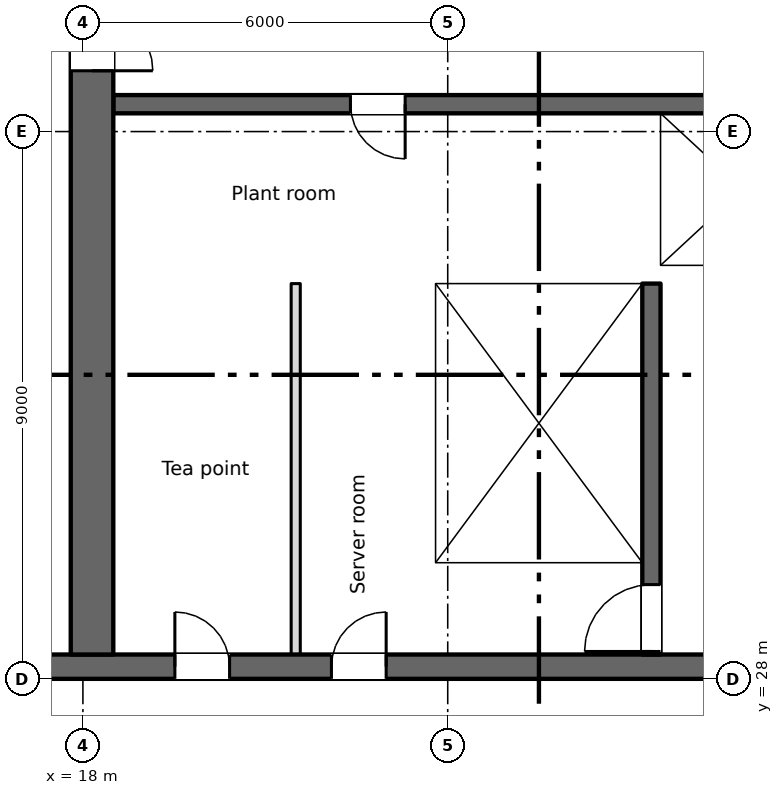
"""IFC4 building model, lengths in metres.
Left out: names, types, materials, properties, quantities, classifications, styles, units other than length and angle.
Written with IfcOpenShell. Run it as: python <this file> out.ifc"""

import sys

from ifc_helpers import new_model, si_unit, direction, frame, frame_2d, origin, place, context, subcontext, project, spatial, rectangle, extrude, element, fill, save


model = new_model("IFC4")
c1 = context("Model", 3, precision=1e-05, world=origin(), true_north=direction((0.0, 1.0)))
c2 = subcontext(c1, "Body", "Model", "MODEL_VIEW")
j1 = project(units=[si_unit("LENGTHUNIT", "METRE"), si_unit("PLANEANGLEUNIT", "RADIAN")], contexts=[c1])
p1 = place(None, origin())
s1 = spatial("IfcSite", under=j1, at=p1, CompositionType="ELEMENT")
p2 = place(p1, origin())
s2 = spatial("IfcBuilding", under=s1, at=p2, CompositionType="ELEMENT")
p3 = place(p2, frame((0.0, 0.0, 185.5)))
s3 = spatial("IfcBuildingStorey", under=s2, at=p3, CompositionType="ELEMENT", Elevation=185.5)
p4 = place(p3, frame((6.6, 28.2, 0.0), z_axis=(0.0, 0.0, 1.0), x_axis=(1.0, 0.0, 0.0)))
e1 = element("IfcWall", 1, at=p4, inside=s3, PredefinedType="SHEAR", context=c2, shape_type="SweptSolid", body=[
    extrude(rectangle(XDim=57.9, YDim=0.4, at=frame_2d((28.95, 0.0))), origin(), (0.0, 0.0, 1.0), 3.35),
])
p5 = place(p4, frame((12.913, 0.0, 0.0)))
e2 = element("IfcOpeningElement", 2, at=p5, cuts=e1, PredefinedType="OPENING", context=c2, shape_type="SweptSolid", body=[
    extrude(rectangle(XDim=0.9, YDim=2.1, at=frame_2d((0.45, 1.05))), frame((0.0, 0.21, 0.0), z_axis=(0.0, -1.0, 0.0), x_axis=(1.0, 0.0, 0.0)), (0.0, 0.0, 1.0), 0.42),
])
p6 = place(p4, frame((15.488, 0.0, 0.0)))
e3 = element("IfcOpeningElement", 3, at=p6, cuts=e1, PredefinedType="OPENING", context=c2, shape_type="SweptSolid", body=[
    extrude(rectangle(XDim=0.9, YDim=2.1, at=frame_2d((0.45, 1.05))), frame((0.0, 0.21, 0.0), z_axis=(0.0, -1.0, 0.0), x_axis=(1.0, 0.0, 0.0)), (0.0, 0.0, 1.0), 0.42),
])
p7 = place(p4, frame((48.413, 0.0, 0.0)))
e4 = element("IfcOpeningElement", 4, at=p7, cuts=e1, PredefinedType="OPENING", context=c2, shape_type="SweptSolid", body=[
    extrude(rectangle(XDim=0.9, YDim=2.1, at=frame_2d((0.45, 1.05))), frame((0.0, 0.21, 0.0), z_axis=(0.0, -1.0, 0.0), x_axis=(1.0, 0.0, 0.0)), (0.0, 0.0, 1.0), 0.42),
])
p8 = place(p4, frame((50.988, 0.0, 0.0)))
e5 = element("IfcOpeningElement", 5, at=p8, cuts=e1, PredefinedType="OPENING", context=c2, shape_type="SweptSolid", body=[
    extrude(rectangle(XDim=0.9, YDim=2.1, at=frame_2d((0.45, 1.05))), frame((0.0, 0.21, 0.0), z_axis=(0.0, -1.0, 0.0), x_axis=(1.0, 0.0, 0.0)), (0.0, 0.0, 1.0), 0.42),
])
p9 = place(p4, frame((0.663, 0.0, 0.0)))
e6 = element("IfcOpeningElement", 6, at=p9, cuts=e1, PredefinedType="OPENING", context=c2, shape_type="SweptSolid", body=[
    extrude(rectangle(XDim=0.9, YDim=2.1, at=frame_2d((0.45, 1.05))), frame((0.0, 0.21, 0.0), z_axis=(0.0, -1.0, 0.0), x_axis=(1.0, 0.0, 0.0)), (0.0, 0.0, 1.0), 0.42),
])
p10 = place(p4, frame((2.238, 0.0, 0.0)))
e7 = element("IfcOpeningElement", 7, at=p10, cuts=e1, PredefinedType="OPENING", context=c2, shape_type="SweptSolid", body=[
    extrude(rectangle(XDim=0.9, YDim=2.1, at=frame_2d((0.45, 1.05))), frame((0.0, 0.21, 0.0), z_axis=(0.0, -1.0, 0.0), x_axis=(1.0, 0.0, 0.0)), (0.0, 0.0, 1.0), 0.42),
])
p11 = place(p4, frame((4.8, 0.0, 0.0)))
e8 = element("IfcOpeningElement", 8, at=p11, cuts=e1, PredefinedType="OPENING", context=c2, shape_type="SweptSolid", body=[
    extrude(rectangle(XDim=1.2, YDim=2.1, at=frame_2d((0.6, 1.05))), frame((0.0, 0.21, 0.0), z_axis=(0.0, -1.0, 0.0), x_axis=(1.0, 0.0, 0.0)), (0.0, 0.0, 1.0), 0.42),
])
p12 = place(p4, frame((31.8, 0.0, 0.0)))
e9 = element("IfcOpeningElement", 9, at=p12, cuts=e1, PredefinedType="OPENING", context=c2, shape_type="SweptSolid", body=[
    extrude(rectangle(XDim=1.2, YDim=2.1, at=frame_2d((0.6, 1.05))), frame((0.0, 0.21, 0.0), z_axis=(0.0, -1.0, 0.0), x_axis=(1.0, 0.0, 0.0)), (0.0, 0.0, 1.0), 0.42),
])
p13 = place(p4, frame((55.3, 0.0, 0.0)))
e10 = element("IfcOpeningElement", 10, at=p13, cuts=e1, PredefinedType="OPENING", context=c2, shape_type="SweptSolid", body=[
    extrude(rectangle(XDim=1.2, YDim=2.1, at=frame_2d((0.6, 1.05))), frame((0.0, 0.21, 0.0), z_axis=(0.0, -1.0, 0.0), x_axis=(1.0, 0.0, 0.0)), (0.0, 0.0, 1.0), 0.42),
])
p14 = place(p4, frame((21.8, 0.0, 0.0)))
e11 = element("IfcOpeningElement", 11, at=p14, cuts=e1, PredefinedType="OPENING", context=c2, shape_type="SweptSolid", body=[
    extrude(rectangle(XDim=1.2, YDim=2.1, at=frame_2d((0.6, 1.05))), frame((0.0, 0.21, 0.0), z_axis=(0.0, -1.0, 0.0), x_axis=(1.0, 0.0, 0.0)), (0.0, 0.0, 1.0), 0.42),
])
p15 = place(p4, frame((41.8, 0.0, 0.0)))
e12 = element("IfcOpeningElement", 12, at=p15, cuts=e1, PredefinedType="OPENING", context=c2, shape_type="SweptSolid", body=[
    extrude(rectangle(XDim=1.2, YDim=2.1, at=frame_2d((0.6, 1.05))), frame((0.0, 0.21, 0.0), z_axis=(0.0, -1.0, 0.0), x_axis=(1.0, 0.0, 0.0)), (0.0, 0.0, 1.0), 0.42),
])
p16 = place(p4, frame((24.95, 0.0, 0.0)))
e13 = element("IfcOpeningElement", 13, at=p16, cuts=e1, PredefinedType="OPENING", context=c2, shape_type="SweptSolid", body=[
    extrude(rectangle(XDim=2.4, YDim=2.1, at=frame_2d((1.2, 1.05))), frame((0.0, 0.21, 0.0), z_axis=(0.0, -1.0, 0.0), x_axis=(1.0, 0.0, 0.0)), (0.0, 0.0, 1.0), 0.42),
])
p17 = place(p4, frame((37.45, 0.0, 0.0)))
e14 = element("IfcOpeningElement", 14, at=p17, cuts=e1, PredefinedType="OPENING", context=c2, shape_type="SweptSolid", body=[
    extrude(rectangle(XDim=2.4, YDim=2.1, at=frame_2d((1.2, 1.05))), frame((0.0, 0.21, 0.0), z_axis=(0.0, -1.0, 0.0), x_axis=(1.0, 0.0, 0.0)), (0.0, 0.0, 1.0), 0.42),
])
p18 = place(p4, frame((8.1, 0.0, 0.0)))
e15 = element("IfcOpeningElement", 15, at=p18, cuts=e1, PredefinedType="OPENING", context=c2, shape_type="SweptSolid", body=[
    extrude(rectangle(XDim=2.4, YDim=2.1, at=frame_2d((1.2, 1.05))), frame((0.0, 0.21, 0.0), z_axis=(0.0, -1.0, 0.0), x_axis=(1.0, 0.0, 0.0)), (0.0, 0.0, 1.0), 0.42),
])
p19 = place(p4, frame((28.95, 0.0, 0.0)))
e16 = element("IfcOpeningElement", 16, at=p19, cuts=e1, PredefinedType="OPENING", context=c2, shape_type="SweptSolid", body=[
    extrude(rectangle(XDim=0.9, YDim=2.1, at=frame_2d((0.45, 1.05))), frame((0.0, 0.21, 0.0), z_axis=(0.0, -1.0, 0.0), x_axis=(1.0, 0.0, 0.0)), (0.0, 0.0, 1.0), 0.42),
])
p20 = place(p4, frame((34.95, 0.0, 0.0)))
e17 = element("IfcOpeningElement", 17, at=p20, cuts=e1, PredefinedType="OPENING", context=c2, shape_type="SweptSolid", body=[
    extrude(rectangle(XDim=0.9, YDim=2.1, at=frame_2d((0.45, 1.05))), frame((0.0, 0.21, 0.0), z_axis=(0.0, -1.0, 0.0), x_axis=(1.0, 0.0, 0.0)), (0.0, 0.0, 1.0), 0.42),
])
p21 = place(p3, frame((18.15, 28.4, 0.0), z_axis=(0.0, 0.0, 1.0), x_axis=(0.0, 1.0, 0.0)))
e18 = element("IfcWall", 18, at=p21, inside=s3, PredefinedType="SHEAR", context=c2, shape_type="SweptSolid", body=[
    extrude(rectangle(XDim=16.9, YDim=0.7, at=frame_2d((8.45, 0.0))), origin(), (0.0, 0.0, 1.0), 3.35),
])
p22 = place(p21, frame((9.6, 0.0, 0.0)))
e19 = element("IfcOpeningElement", 19, at=p22, cuts=e18, PredefinedType="OPENING", context=c2, shape_type="SweptSolid", body=[
    extrude(rectangle(XDim=2.0, YDim=2.1, at=frame_2d((1.0, 1.05))), frame((0.0, 0.36, 0.0), z_axis=(0.0, -1.0, 0.0), x_axis=(1.0, 0.0, 0.0)), (0.0, 0.0, 1.0), 0.72),
])
p23 = place(p21, frame((15.4, 0.0, 0.0)))
e20 = element("IfcOpeningElement", 20, at=p23, cuts=e18, PredefinedType="OPENING", context=c2, shape_type="SweptSolid", body=[
    extrude(rectangle(XDim=1.2, YDim=2.1, at=frame_2d((0.6, 1.05))), frame((0.0, 0.36, 0.0), z_axis=(0.0, -1.0, 0.0), x_axis=(1.0, 0.0, 0.0)), (0.0, 0.0, 1.0), 0.72),
])
p24 = place(p3, frame((23.65, 28.4, 0.0), z_axis=(0.0, 0.0, 1.0), x_axis=(0.0, 1.0, 0.0)))
e21 = element("IfcWall", 21, at=p24, inside=s3, PredefinedType="SHEAR", context=c2, shape_type="SweptSolid", body=[
    extrude(rectangle(XDim=6.1, YDim=0.3, at=frame_2d((3.05, 0.0))), origin(), (0.0, 0.0, 1.0), 3.35),
])
p25 = place(p3, frame((27.35, 28.4, 0.0), z_axis=(0.0, 0.0, 1.0), x_axis=(0.0, 1.0, 0.0)))
e22 = element("IfcWall", 22, at=p25, inside=s3, PredefinedType="SHEAR", context=c2, shape_type="SweptSolid", body=[
    extrude(rectangle(XDim=6.1, YDim=0.3, at=frame_2d((3.05, 0.0))), origin(), (0.0, 0.0, 1.0), 3.35),
])
p26 = place(p25, frame((0.05, 0.0, 0.0)))
e23 = element("IfcOpeningElement", 23, at=p26, cuts=e22, PredefinedType="OPENING", context=c2, shape_type="SweptSolid", body=[
    extrude(rectangle(XDim=1.1, YDim=2.1, at=frame_2d((0.55, 1.05))), frame((0.0, 0.16, 0.0), z_axis=(0.0, -1.0, 0.0), x_axis=(1.0, 0.0, 0.0)), (0.0, 0.0, 1.0), 0.32),
])
p27 = place(p3, frame((18.5, 34.65, 0.0), z_axis=(0.0, 0.0, 1.0), x_axis=(1.0, 0.0, 0.0)))
e24 = element("IfcWall", 24, at=p27, inside=s3, PredefinedType="SHEAR", context=c2, shape_type="SweptSolid", body=[
    extrude(rectangle(XDim=12.2, YDim=0.3, at=frame_2d((6.1, 0.0))), origin(), (0.0, 0.0, 1.0), 3.35),
])
p28 = place(p27, frame((9.8, 0.0, 0.0)))
e25 = element("IfcOpeningElement", 25, at=p28, cuts=e24, PredefinedType="OPENING", context=c2, shape_type="SweptSolid", body=[
    extrude(rectangle(XDim=1.1, YDim=2.1, at=frame_2d((0.55, 1.05))), frame((0.0, 0.16, 0.0), z_axis=(0.0, -1.0, 0.0), x_axis=(1.0, 0.0, 0.0)), (0.0, 0.0, 1.0), 0.32),
])
p29 = place(p3, frame((30.7, 37.45, 0.0), z_axis=(0.0, 0.0, 1.0), x_axis=(-1.0, 0.0, 0.0)))
e26 = element("IfcWall", 26, at=p29, inside=s3, PredefinedType="SHEAR", context=c2, shape_type="SweptSolid", body=[
    extrude(rectangle(XDim=12.2, YDim=0.3, at=frame_2d((6.1, 0.0))), origin(), (0.0, 0.0, 1.0), 3.35),
])
p30 = place(p29, frame((7.4, 0.0, 0.0)))
e27 = element("IfcOpeningElement", 27, at=p30, cuts=e26, PredefinedType="OPENING", context=c2, shape_type="SweptSolid", body=[
    extrude(rectangle(XDim=0.9, YDim=2.1, at=frame_2d((0.45, 1.05))), frame((0.0, 0.16, 0.0), z_axis=(0.0, -1.0, 0.0), x_axis=(1.0, 0.0, 0.0)), (0.0, 0.0, 1.0), 0.32),
])
p31 = place(p3, frame((27.35, 34.8, 0.0), z_axis=(0.0, 0.0, 1.0), x_axis=(0.0, 1.0, 0.0)))
e28 = element("IfcWall", 28, at=p31, inside=s3, PredefinedType="SHEAR", context=c2, shape_type="SweptSolid", body=[
    extrude(rectangle(XDim=2.5, YDim=0.3, at=frame_2d((1.25, 0.0))), origin(), (0.0, 0.0, 1.0), 3.35),
])
p32 = place(p3, frame((21.5, 28.4, 0.0), z_axis=(0.0, 0.0, 1.0), x_axis=(0.0, 1.0, 0.0)))
e29 = element("IfcWall", 29, at=p32, inside=s3, PredefinedType="PARTITIONING", context=c2, shape_type="SweptSolid", body=[
    extrude(rectangle(XDim=6.1, YDim=0.15, at=frame_2d((3.05, 0.0))), origin(), (0.0, 0.0, 1.0), 3.35),
])
p33 = place(p5, origin())
e30 = element("IfcDoor", 30, at=p33, inside=s3, OperationType="SINGLE_SWING_LEFT", PredefinedType="DOOR", context=c2, shape_type="SweptSolid", body=[
    extrude(rectangle(XDim=0.9, YDim=2.1, at=frame_2d((0.45, 1.05))), frame((0.0, 0.025, 0.0), z_axis=(0.0, -1.0, 0.0), x_axis=(1.0, 0.0, 0.0)), (0.0, 0.0, 1.0), 0.05),
])
fill(e2, e30)
p34 = place(p6, origin())
e31 = element("IfcDoor", 31, at=p34, inside=s3, OperationType="SINGLE_SWING_RIGHT", PredefinedType="DOOR", context=c2, shape_type="SweptSolid", body=[
    extrude(rectangle(XDim=0.9, YDim=2.1, at=frame_2d((0.45, 1.05))), frame((0.0, 0.025, 0.0), z_axis=(0.0, -1.0, 0.0), x_axis=(1.0, 0.0, 0.0)), (0.0, 0.0, 1.0), 0.05),
])
fill(e3, e31)
p35 = place(p30, origin())
e32 = element("IfcDoor", 32, at=p35, inside=s3, OperationType="SINGLE_SWING_LEFT", PredefinedType="DOOR", context=c2, shape_type="SweptSolid", body=[
    extrude(rectangle(XDim=0.9, YDim=2.1, at=frame_2d((0.45, 1.05))), frame((0.0, 0.025, 0.0), z_axis=(0.0, -1.0, 0.0), x_axis=(1.0, 0.0, 0.0)), (0.0, 0.0, 1.0), 0.05),
])
fill(e27, e32)
p36 = place(p26, origin())
e33 = element("IfcDoor", 33, at=p36, inside=s3, OperationType="SINGLE_SWING_LEFT", PredefinedType="DOOR", context=c2, shape_type="SweptSolid", body=[
    extrude(rectangle(XDim=1.1, YDim=2.1, at=frame_2d((0.55, 1.05))), frame((0.0, 0.025, 0.0), z_axis=(0.0, -1.0, 0.0), x_axis=(1.0, 0.0, 0.0)), (0.0, 0.0, 1.0), 0.05),
])
fill(e23, e33)
p37 = place(p22, origin())
e34 = element("IfcDoor", 34, at=p37, inside=s3, OperationType="DOUBLE_DOOR_SINGLE_SWING", PredefinedType="DOOR", context=c2, shape_type="SweptSolid", body=[
    extrude(rectangle(XDim=2.0, YDim=2.1, at=frame_2d((1.0, 1.05))), frame((0.0, 0.025, 0.0), z_axis=(0.0, -1.0, 0.0), x_axis=(1.0, 0.0, 0.0)), (0.0, 0.0, 1.0), 0.05),
])
fill(e19, e34)
save(model, sys.argv[1])
